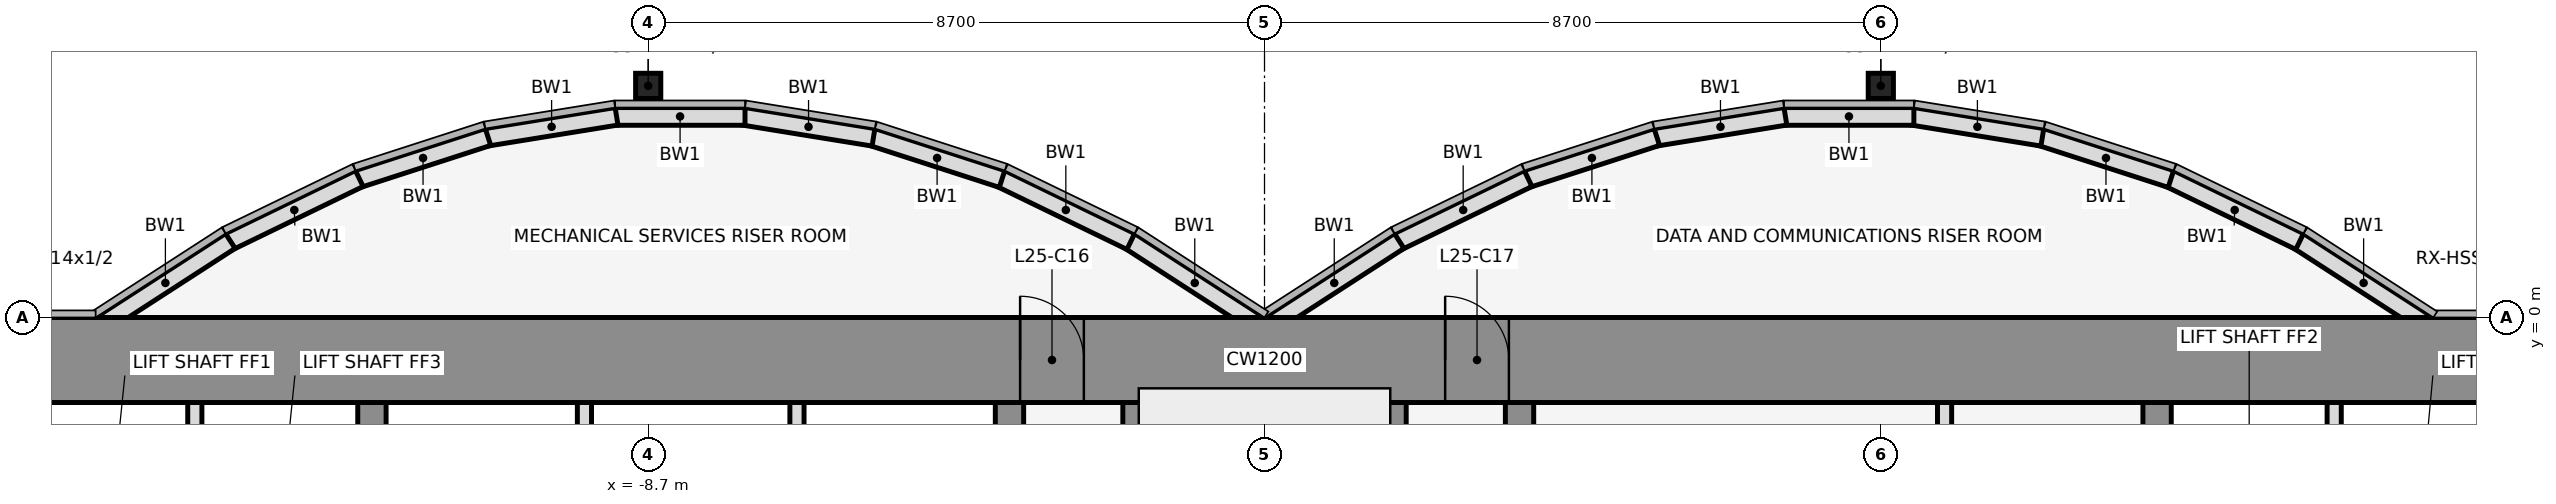
"""IFC4 building model, lengths in metres.
Left out: names, types, materials, properties, quantities, classifications, styles, units other than length and angle.
Written with IfcOpenShell. Run it as: python <this file> out.ifc"""

import sys

from ifc_helpers import new_model, si_unit, direction, frame, frame_2d, origin, origin_2d, place, context, subcontext, project, spatial, rectangle, hollow_rectangle, extrude, element, fill, save


model = new_model("IFC4")
c1 = context("Model", 3, precision=1e-05, world=origin(), true_north=direction((0.0, 1.0)))
c2 = subcontext(c1, "Body", "Model", "MODEL_VIEW")
j1 = project(units=[si_unit("LENGTHUNIT", "METRE"), si_unit("PLANEANGLEUNIT", "RADIAN")], contexts=[c1])
p1 = place(None, origin())
s1 = spatial("IfcSite", under=j1, at=p1, CompositionType="ELEMENT")
p2 = place(p1, origin())
s2 = spatial("IfcBuilding", under=s1, at=p2, CompositionType="ELEMENT")
p3 = place(p2, frame((0.0, 0.0, 118.6)))
s3 = spatial("IfcBuildingStorey", under=s2, at=p3, CompositionType="ELEMENT", Elevation=118.6)
for number, where, z_axis, x_axis in (
    (1, (-8.7, 3.269, 0.0), (0.0, 0.0, 1.0), (1.0, 0.0, 0.0)),
    (2, (8.7, 3.269, 0.0), (0.0, 0.0, 1.0), (1.0, 0.0, 0.0)),
):
    element("IfcColumn", number, at=place(p3, frame(where, z_axis=z_axis, x_axis=x_axis)), inside=s3, PredefinedType="COLUMN", context=c2, shape_type="SweptSolid", body=[
        extrude(hollow_rectangle(XDim=0.356, YDim=0.356, WallThickness=0.012, at=origin_2d()), origin(), (0.0, 0.0, 1.0), 4.1),
    ])
p4 = place(p3, frame((16.432, -0.105, 0.0), z_axis=(0.0, 0.0, 1.0), x_axis=(-0.83981312244, 0.542875602121, 0.0)))
e3 = element("IfcWall", 3, at=p4, inside=s3, PredefinedType="STANDARD", context=c2, shape_type="SweptSolid", body=[
    extrude(rectangle(XDim=2.183, YDim=0.25, at=frame_2d((1.091, 0.0))), origin(), (0.0, 0.0, 1.0), 3.95),
])
p5 = place(p3, frame((14.612, 1.073, 0.0), z_axis=(0.0, 0.0, 1.0), x_axis=(-0.89982408427, 0.436252928206, 0.0)))
e4 = element("IfcWall", 4, at=p5, inside=s3, PredefinedType="STANDARD", context=c2, shape_type="SweptSolid", body=[
    extrude(rectangle(XDim=2.038, YDim=0.25, at=frame_2d((1.019, 0.0))), origin(), (0.0, 0.0, 1.0), 3.95),
])
p6 = place(p3, frame((12.795, 1.955, 0.0), z_axis=(0.0, 0.0, 1.0), x_axis=(-0.951495806175, 0.307661714928, 0.0)))
e5 = element("IfcWall", 5, at=p6, inside=s3, PredefinedType="STANDARD", context=c2, shape_type="SweptSolid", body=[
    extrude(rectangle(XDim=1.927, YDim=0.25, at=frame_2d((0.963, 0.0))), origin(), (0.0, 0.0, 1.0), 3.95),
])
p7 = place(p3, frame((10.98, 2.543, 0.0), z_axis=(0.0, 0.0, 1.0), x_axis=(-0.987181718931, 0.159600293885, 0.0)))
e6 = element("IfcWall", 6, at=p7, inside=s3, PredefinedType="STANDARD", context=c2, shape_type="SweptSolid", body=[
    extrude(rectangle(XDim=1.857, YDim=0.25, at=frame_2d((0.929, 0.0))), origin(), (0.0, 0.0, 1.0), 3.95),
])
p8 = place(p3, frame((9.167, 2.838, 0.0), z_axis=(0.0, 0.0, 1.0), x_axis=(-1.0, 0.0, 0.0)))
e7 = element("IfcWall", 7, at=p8, inside=s3, PredefinedType="STANDARD", context=c2, shape_type="SweptSolid", body=[
    extrude(rectangle(XDim=1.833, YDim=0.25, at=frame_2d((0.917, 0.0))), origin(), (0.0, 0.0, 1.0), 3.95),
])
p9 = place(p3, frame((7.353, 2.84, 0.0), z_axis=(0.0, 0.0, 1.0), x_axis=(-0.987181718931, -0.159600293885, 0.0)))
e8 = element("IfcWall", 8, at=p9, inside=s3, PredefinedType="STANDARD", context=c2, shape_type="SweptSolid", body=[
    extrude(rectangle(XDim=1.857, YDim=0.25, at=frame_2d((0.929, 0.0))), origin(), (0.0, 0.0, 1.0), 3.95),
])
p10 = place(p3, frame((5.538, 2.548, 0.0), z_axis=(0.0, 0.0, 1.0), x_axis=(-0.951495806175, -0.307661714928, 0.0)))
e9 = element("IfcWall", 9, at=p10, inside=s3, PredefinedType="STANDARD", context=c2, shape_type="SweptSolid", body=[
    extrude(rectangle(XDim=1.927, YDim=0.25, at=frame_2d((0.963, 0.0))), origin(), (0.0, 0.0, 1.0), 3.95),
])
p11 = place(p3, frame((3.721, 1.962, 0.0), z_axis=(0.0, 0.0, 1.0), x_axis=(-0.89982408427, -0.436252928206, 0.0)))
e10 = element("IfcWall", 10, at=p11, inside=s3, PredefinedType="STANDARD", context=c2, shape_type="SweptSolid", body=[
    extrude(rectangle(XDim=2.038, YDim=0.25, at=frame_2d((1.019, 0.0))), origin(), (0.0, 0.0, 1.0), 3.95),
])
for number, where, z_axis, x_axis in (
    (11, (1.901, 1.08, 0.0), (0.0, 0.0, 1.0), (-0.84, -0.543, 0.0)),
    (12, (-0.068, -0.105, 0.0), (0.0, 0.0, 1.0), (-0.84, 0.543, 0.0)),
):
    element("IfcWall", number, at=place(p3, frame(where, z_axis=z_axis, x_axis=x_axis)), inside=s3, PredefinedType="STANDARD", context=c2, shape_type="SweptSolid", body=[
        extrude(rectangle(XDim=2.183, YDim=0.25, at=frame_2d((1.091, 0.0))), origin(), (0.0, 0.0, 1.0), 3.95),
    ])
p12 = place(p3, frame((-1.888, 1.073, 0.0), z_axis=(0.0, 0.0, 1.0), x_axis=(-0.89982408427, 0.436252928206, 0.0)))
e13 = element("IfcWall", 13, at=p12, inside=s3, PredefinedType="STANDARD", context=c2, shape_type="SweptSolid", body=[
    extrude(rectangle(XDim=2.038, YDim=0.25, at=frame_2d((1.019, 0.0))), origin(), (0.0, 0.0, 1.0), 3.95),
])
p13 = place(p3, frame((-3.705, 1.955, 0.0), z_axis=(0.0, 0.0, 1.0), x_axis=(-0.951495806175, 0.307661714928, 0.0)))
e14 = element("IfcWall", 14, at=p13, inside=s3, PredefinedType="STANDARD", context=c2, shape_type="SweptSolid", body=[
    extrude(rectangle(XDim=1.927, YDim=0.25, at=frame_2d((0.963, 0.0))), origin(), (0.0, 0.0, 1.0), 3.95),
])
p14 = place(p3, frame((-5.52, 2.543, 0.0), z_axis=(0.0, 0.0, 1.0), x_axis=(-0.987181718931, 0.159600293885, 0.0)))
e15 = element("IfcWall", 15, at=p14, inside=s3, PredefinedType="STANDARD", context=c2, shape_type="SweptSolid", body=[
    extrude(rectangle(XDim=1.857, YDim=0.25, at=frame_2d((0.929, 0.0))), origin(), (0.0, 0.0, 1.0), 3.95),
])
p15 = place(p3, frame((-7.333, 2.838, 0.0), z_axis=(0.0, 0.0, 1.0), x_axis=(-1.0, 0.0, 0.0)))
e16 = element("IfcWall", 16, at=p15, inside=s3, PredefinedType="STANDARD", context=c2, shape_type="SweptSolid", body=[
    extrude(rectangle(XDim=1.833, YDim=0.25, at=frame_2d((0.917, 0.0))), origin(), (0.0, 0.0, 1.0), 3.95),
])
p16 = place(p3, frame((-9.147, 2.84, 0.0), z_axis=(0.0, 0.0, 1.0), x_axis=(-0.987181718931, -0.159600293885, 0.0)))
e17 = element("IfcWall", 17, at=p16, inside=s3, PredefinedType="STANDARD", context=c2, shape_type="SweptSolid", body=[
    extrude(rectangle(XDim=1.857, YDim=0.25, at=frame_2d((0.929, 0.0))), origin(), (0.0, 0.0, 1.0), 3.95),
])
p17 = place(p3, frame((-10.962, 2.548, 0.0), z_axis=(0.0, 0.0, 1.0), x_axis=(-0.951495806175, -0.307661714928, 0.0)))
e18 = element("IfcWall", 18, at=p17, inside=s3, PredefinedType="STANDARD", context=c2, shape_type="SweptSolid", body=[
    extrude(rectangle(XDim=1.927, YDim=0.25, at=frame_2d((0.963, 0.0))), origin(), (0.0, 0.0, 1.0), 3.95),
])
p18 = place(p3, frame((-12.779, 1.962, 0.0), z_axis=(0.0, 0.0, 1.0), x_axis=(-0.89982408427, -0.436252928206, 0.0)))
e19 = element("IfcWall", 19, at=p18, inside=s3, PredefinedType="STANDARD", context=c2, shape_type="SweptSolid", body=[
    extrude(rectangle(XDim=2.038, YDim=0.25, at=frame_2d((1.019, 0.0))), origin(), (0.0, 0.0, 1.0), 3.95),
])
p19 = place(p3, frame((-14.599, 1.08, 0.0), z_axis=(0.0, 0.0, 1.0), x_axis=(-0.83981312244, -0.542875602121, 0.0)))
e20 = element("IfcWall", 20, at=p19, inside=s3, PredefinedType="STANDARD", context=c2, shape_type="SweptSolid", body=[
    extrude(rectangle(XDim=2.183, YDim=0.25, at=frame_2d((1.091, 0.0))), origin(), (0.0, 0.0, 1.0), 3.95),
])
p20 = place(p3, frame((-15.1, -4.6, 0.0), z_axis=(0.0, 0.0, 1.0), x_axis=(0.0, 1.0, 0.0)))
e21 = element("IfcWall", 21, at=p20, inside=s3, PredefinedType="PARTITIONING", context=c2, shape_type="SweptSolid", body=[
    extrude(rectangle(XDim=3.4, YDim=0.2, at=frame_2d((1.7, 0.0))), origin(), (0.0, 0.0, 1.0), 3.018),
])
p21 = place(p3, frame((-12.6, -11.8, 0.0), z_axis=(0.0, 0.0, 1.0), x_axis=(0.0, 1.0, 0.0)))
e22 = element("IfcWall", 22, at=p21, inside=s3, PredefinedType="SHEAR", context=c2, shape_type="SweptSolid", body=[
    extrude(rectangle(XDim=10.6, YDim=0.4, at=frame_2d((5.3, 0.0))), origin(), (0.0, 0.0, 1.0), 4.1),
])
p22 = place(p21, frame((4.75, 0.0, 0.0)))
e23 = element("IfcOpeningElement", 23, at=p22, cuts=e22, PredefinedType="OPENING", context=c2, shape_type="SweptSolid", body=[
    extrude(rectangle(XDim=1.1, YDim=2.1, at=frame_2d((0.55, 1.05))), frame((0.0, 0.212, 0.0), z_axis=(0.0, -1.0, 0.0), x_axis=(1.0, 0.0, 0.0)), (0.0, 0.0, 1.0), 0.424),
])
for number, where, z_axis, x_axis in (
    (24, (-9.6, -4.6, 0.0), (0.0, 0.0, 1.0), (0.0, 1.0, 0.0)),
    (25, (-6.6, -4.6, 0.0), (0.0, 0.0, 1.0), (0.0, 1.0, 0.0)),
):
    element("IfcWall", number, at=place(p3, frame(where, z_axis=z_axis, x_axis=x_axis)), inside=s3, PredefinedType="PARTITIONING", context=c2, shape_type="SweptSolid", body=[
        extrude(rectangle(XDim=3.4, YDim=0.2, at=frame_2d((1.7, 0.0))), origin(), (0.0, 0.0, 1.0), 3.018),
    ])
p23 = place(p3, frame((-3.6, -11.8, 0.0), z_axis=(0.0, 0.0, 1.0), x_axis=(0.0, 1.0, 0.0)))
e26 = element("IfcWall", 26, at=p23, inside=s3, PredefinedType="SHEAR", context=c2, shape_type="SweptSolid", body=[
    extrude(rectangle(XDim=10.6, YDim=0.4, at=frame_2d((5.3, 0.0))), origin(), (0.0, 0.0, 1.0), 4.1),
])
p24 = place(p23, frame((4.85, 0.0, 0.0)))
e27 = element("IfcOpeningElement", 27, at=p24, cuts=e26, PredefinedType="OPENING", context=c2, shape_type="SweptSolid", body=[
    extrude(rectangle(XDim=0.9, YDim=2.1, at=frame_2d((0.45, 1.05))), frame((0.0, 0.212, 0.0), z_axis=(0.0, -1.0, 0.0), x_axis=(1.0, 0.0, 0.0)), (0.0, 0.0, 1.0), 0.424),
])
for number, where, z_axis, x_axis in (
    (28, (-1.8, -11.8, 0.0), (0.0, 0.0, 1.0), (0.0, 1.0, 0.0)),
    (29, (1.8, -11.8, 0.0), (0.0, 0.0, 1.0), (0.0, 1.0, 0.0)),
):
    element("IfcWall", number, at=place(p3, frame(where, z_axis=z_axis, x_axis=x_axis)), inside=s3, PredefinedType="SHEAR", context=c2, shape_type="SweptSolid", body=[
        extrude(rectangle(XDim=10.6, YDim=0.4, at=frame_2d((5.3, 0.0))), origin(), (0.0, 0.0, 1.0), 4.1),
    ])
p25 = place(p3, frame((3.6, -11.8, 0.0), z_axis=(0.0, 0.0, 1.0), x_axis=(0.0, 1.0, 0.0)))
e30 = element("IfcWall", 30, at=p25, inside=s3, PredefinedType="SHEAR", context=c2, shape_type="SweptSolid", body=[
    extrude(rectangle(XDim=10.6, YDim=0.4, at=frame_2d((5.3, 0.0))), origin(), (0.0, 0.0, 1.0), 4.1),
])
p26 = place(p25, frame((1.35, 0.0, 0.0)))
e31 = element("IfcOpeningElement", 31, at=p26, cuts=e30, PredefinedType="OPENING", context=c2, shape_type="SweptSolid", body=[
    extrude(rectangle(XDim=0.9, YDim=2.1, at=frame_2d((0.45, 1.05))), frame((0.0, 0.212, 0.0), z_axis=(0.0, -1.0, 0.0), x_axis=(1.0, 0.0, 0.0)), (0.0, 0.0, 1.0), 0.424),
])
p27 = place(p3, frame((9.6, -4.6, 0.0), z_axis=(0.0, 0.0, 1.0), x_axis=(0.0, 1.0, 0.0)))
e32 = element("IfcWall", 32, at=p27, inside=s3, PredefinedType="PARTITIONING", context=c2, shape_type="SweptSolid", body=[
    extrude(rectangle(XDim=3.4, YDim=0.2, at=frame_2d((1.7, 0.0))), origin(), (0.0, 0.0, 1.0), 3.018),
])
p28 = place(p3, frame((12.6, -11.8, 0.0), z_axis=(0.0, 0.0, 1.0), x_axis=(0.0, 1.0, 0.0)))
e33 = element("IfcWall", 33, at=p28, inside=s3, PredefinedType="SHEAR", context=c2, shape_type="SweptSolid", body=[
    extrude(rectangle(XDim=10.6, YDim=0.4, at=frame_2d((5.3, 0.0))), origin(), (0.0, 0.0, 1.0), 4.1),
])
p29 = place(p28, frame((4.75, 0.0, 0.0)))
e34 = element("IfcOpeningElement", 34, at=p29, cuts=e33, PredefinedType="OPENING", context=c2, shape_type="SweptSolid", body=[
    extrude(rectangle(XDim=1.1, YDim=2.1, at=frame_2d((0.55, 1.05))), frame((0.0, 0.212, 0.0), z_axis=(0.0, -1.0, 0.0), x_axis=(1.0, 0.0, 0.0)), (0.0, 0.0, 1.0), 0.424),
])
p30 = place(p3, frame((15.1, -4.6, 0.0), z_axis=(0.0, 0.0, 1.0), x_axis=(0.0, 1.0, 0.0)))
e35 = element("IfcWall", 35, at=p30, inside=s3, PredefinedType="PARTITIONING", context=c2, shape_type="SweptSolid", body=[
    extrude(rectangle(XDim=3.4, YDim=0.2, at=frame_2d((1.7, 0.0))), origin(), (0.0, 0.0, 1.0), 3.018),
])
p31 = place(p3, frame((-22.0, -0.6, 0.0), z_axis=(0.0, 0.0, 1.0), x_axis=(1.0, 0.0, 0.0)))
e36 = element("IfcWall", 36, at=p31, inside=s3, PredefinedType="SHEAR", context=c2, shape_type="SweptSolid", body=[
    extrude(rectangle(XDim=44.0, YDim=1.2, at=frame_2d((22.0, 0.0))), origin(), (0.0, 0.0, 1.0), 4.1),
])
p32 = place(p31, frame((18.55, 0.0, 0.0)))
e37 = element("IfcOpeningElement", 37, at=p32, cuts=e36, PredefinedType="OPENING", context=c2, shape_type="SweptSolid", body=[
    extrude(rectangle(XDim=0.9, YDim=2.1, at=frame_2d((0.45, 1.05))), frame((0.0, 0.612, 0.0), z_axis=(0.0, -1.0, 0.0), x_axis=(1.0, 0.0, 0.0)), (0.0, 0.0, 1.0), 1.224),
])
p33 = place(p31, frame((24.55, 0.0, 0.0)))
e38 = element("IfcOpeningElement", 38, at=p33, cuts=e36, PredefinedType="OPENING", context=c2, shape_type="SweptSolid", body=[
    extrude(rectangle(XDim=0.9, YDim=2.1, at=frame_2d((0.45, 1.05))), frame((0.0, 0.612, 0.0), z_axis=(0.0, -1.0, 0.0), x_axis=(1.0, 0.0, 0.0)), (0.0, 0.0, 1.0), 1.224),
])
p34 = place(p32, origin())
e39 = element("IfcDoor", 39, at=p34, inside=s3, OperationType="SINGLE_SWING_LEFT", PredefinedType="DOOR", context=c2, shape_type="SweptSolid", body=[
    extrude(rectangle(XDim=0.9, YDim=2.1, at=frame_2d((0.45, 1.05))), frame((0.0, 0.025, 0.0), z_axis=(0.0, -1.0, 0.0), x_axis=(1.0, 0.0, 0.0)), (0.0, 0.0, 1.0), 0.05),
])
fill(e37, e39)
p35 = place(p33, origin())
e40 = element("IfcDoor", 40, at=p35, inside=s3, OperationType="SINGLE_SWING_LEFT", PredefinedType="DOOR", context=c2, shape_type="SweptSolid", body=[
    extrude(rectangle(XDim=0.9, YDim=2.1, at=frame_2d((0.45, 1.05))), frame((0.0, 0.025, 0.0), z_axis=(0.0, -1.0, 0.0), x_axis=(1.0, 0.0, 0.0)), (0.0, 0.0, 1.0), 0.05),
])
fill(e38, e40)
save(model, sys.argv[1])
